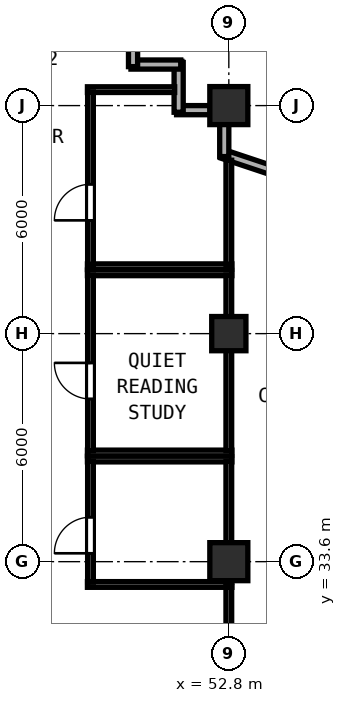
"""IFC4 building model, lengths in metres.
Left out: names, types, materials, properties, quantities, classifications, styles, units other than length and angle.
Written with IfcOpenShell. Run it as: python <this file> out.ifc"""

import sys

from ifc_helpers import new_model, si_unit, direction, frame, frame_2d, origin, origin_2d, place, context, subcontext, project, spatial, rectangle, hollow_rectangle, extrude, element, fill, save


model = new_model("IFC4")
c1 = context("Model", 3, precision=1e-05, world=origin(), true_north=direction((0.0, 1.0)))
c2 = subcontext(c1, "Body", "Model", "MODEL_VIEW")
j1 = project(units=[si_unit("LENGTHUNIT", "METRE"), si_unit("PLANEANGLEUNIT", "RADIAN")], contexts=[c1])
p1 = place(None, origin())
s1 = spatial("IfcSite", under=j1, at=p1, CompositionType="ELEMENT")
p2 = place(p1, origin())
s2 = spatial("IfcBuilding", under=s1, at=p2, CompositionType="ELEMENT")
p3 = place(p2, frame((0.0, 0.0, 121.2)))
s3 = spatial("IfcBuildingStorey", under=s2, at=p3, CompositionType="ELEMENT", Elevation=121.2)
for number, where, z_axis, x_axis in (
    (1, (52.8, 33.6, 0.0), (0.0, 0.0, 1.0), (1.0, 0.0, 0.0)),
    (2, (52.8, 45.6, 0.0), (0.0, 0.0, 1.0), (1.0, 0.0, 0.0)),
):
    element("IfcColumn", number, at=place(p3, frame(where, z_axis=z_axis, x_axis=x_axis)), inside=s3, PredefinedType="COLUMN", context=c2, shape_type="SweptSolid", body=[
        extrude(hollow_rectangle(XDim=1.0, YDim=1.0, WallThickness=0.038, at=origin_2d()), origin(), (0.0, 0.0, 1.0), 3.8),
    ])
p4 = place(p3, frame((52.8, 39.6, 0.0), z_axis=(0.0, 0.0, 1.0), x_axis=(1.0, 0.0, 0.0)))
e3 = element("IfcColumn", 3, at=p4, inside=s3, PredefinedType="COLUMN", context=c2, shape_type="SweptSolid", body=[
    extrude(hollow_rectangle(XDim=0.9, YDim=0.9, WallThickness=0.034, at=origin_2d()), origin(), (0.0, 0.0, 1.0), 3.8),
])
p5 = place(p3, frame((58.295, 42.442, 0.0), z_axis=(0.0, 0.0, 1.0), x_axis=(-0.948687385027, 0.316215504823, 0.0)))
e4 = element("IfcWall", 4, at=p5, inside=s3, PredefinedType="SOLIDWALL", context=c2, shape_type="SweptSolid", body=[
    extrude(rectangle(XDim=5.973, YDim=0.24, at=frame_2d((2.987, 0.0))), origin(), (0.0, 0.0, 1.0), 3.145),
])
p6 = place(p5, frame((1.796, 0.0, 0.85)))
e5 = element("IfcOpeningElement", 5, at=p6, cuts=e4, PredefinedType="OPENING", context=c2, shape_type="SweptSolid", body=[
    extrude(rectangle(XDim=1.15, YDim=1.8, at=frame_2d((0.575, 0.9))), frame((0.0, 0.13, 0.0), z_axis=(0.0, -1.0, 0.0), x_axis=(1.0, 0.0, 0.0)), (0.0, 0.0, 1.0), 0.26),
])
p7 = place(p5, frame((0.505, 0.0, 0.85)))
e6 = element("IfcOpeningElement", 6, at=p7, cuts=e4, PredefinedType="OPENING", context=c2, shape_type="SweptSolid", body=[
    extrude(rectangle(XDim=0.65, YDim=1.75, at=frame_2d((0.325, 0.875))), frame((0.0, 0.13, 0.0), z_axis=(0.0, -1.0, 0.0), x_axis=(1.0, 0.0, 0.0)), (0.0, 0.0, 1.0), 0.26),
])
p8 = place(p3, frame((52.68, 44.259, 0.0), z_axis=(0.0, 0.0, 1.0), x_axis=(0.0, 1.0, 0.0)))
e7 = element("IfcWall", 7, at=p8, inside=s3, PredefinedType="SOLIDWALL", context=c2, shape_type="SweptSolid", body=[
    extrude(rectangle(XDim=0.849, YDim=0.24, at=frame_2d((0.425, 0.0))), origin(), (0.0, 0.0, 1.0), 3.145),
])
p9 = place(p3, frame((52.308, 45.48, 0.0), z_axis=(0.0, 0.0, 1.0), x_axis=(-1.0, 0.0, 0.0)))
e8 = element("IfcWall", 8, at=p9, inside=s3, PredefinedType="SOLIDWALL", context=c2, shape_type="SweptSolid", body=[
    extrude(rectangle(XDim=0.883, YDim=0.24, at=frame_2d((0.441, 0.0))), origin(), (0.0, 0.0, 1.0), 3.6),
])
p10 = place(p3, frame((51.48, 45.425, 0.0), z_axis=(0.0, 0.0, 1.0), x_axis=(0.0, 1.0, 0.0)))
e9 = element("IfcWall", 9, at=p10, inside=s3, PredefinedType="SOLIDWALL", context=c2, shape_type="SweptSolid", body=[
    extrude(rectangle(XDim=1.31, YDim=0.24, at=frame_2d((0.655, 0.0))), origin(), (0.0, 0.0, 1.0), 3.6),
])
p11 = place(p3, frame((51.535, 46.68, 0.0), z_axis=(0.0, 0.0, 1.0), x_axis=(-1.0, 0.0, 0.0)))
e10 = element("IfcWall", 10, at=p11, inside=s3, PredefinedType="SOLIDWALL", context=c2, shape_type="SweptSolid", body=[
    extrude(rectangle(XDim=1.31, YDim=0.24, at=frame_2d((0.655, 0.0))), origin(), (0.0, 0.0, 1.0), 3.6),
])
p12 = place(p3, frame((50.28, 46.625, 0.0), z_axis=(0.0, 0.0, 1.0), x_axis=(0.0, 1.0, 0.0)))
e11 = element("IfcWall", 11, at=p12, inside=s3, PredefinedType="SOLIDWALL", context=c2, shape_type="SweptSolid", body=[
    extrude(rectangle(XDim=1.54, YDim=0.24, at=frame_2d((0.77, 0.0))), origin(), (0.0, 0.0, 1.0), 3.6),
])
for number, where, z_axis, x_axis in (
    (12, (49.08, 36.3, 0.0), (0.0, 0.0, 1.0), (1.0, 0.0, 0.0)),
    (13, (49.08, 33.0, 0.0), (0.0, 0.0, 1.0), (1.0, 0.0, 0.0)),
):
    element("IfcWall", number, at=place(p3, frame(where, z_axis=z_axis, x_axis=x_axis)), inside=s3, PredefinedType="PARTITIONING", context=c2, shape_type="SweptSolid", body=[
        extrude(rectangle(XDim=3.8, YDim=0.15, at=frame_2d((1.9, 0.0))), origin(), (0.0, 0.0, 1.0), 3.6),
    ])
p13 = place(p3, frame((49.16, 33.06, 0.0), z_axis=(0.0, 0.0, 1.0), x_axis=(0.0, 1.0, 0.0)))
e14 = element("IfcWall", 14, at=p13, inside=s3, PredefinedType="PARTITIONING", context=c2, shape_type="SweptSolid", body=[
    extrude(rectangle(XDim=3.18, YDim=0.15, at=frame_2d((1.59, 0.0))), origin(), (0.0, 0.0, 1.0), 3.6),
])
p14 = place(p13, frame((0.76, 0.0, 0.0)))
e15 = element("IfcOpeningElement", 15, at=p14, cuts=e14, PredefinedType="OPENING", context=c2, shape_type="SweptSolid", body=[
    extrude(rectangle(XDim=0.95, YDim=2.12, at=frame_2d((0.475, 1.06))), frame((0.0, 0.085, 0.0), z_axis=(0.0, -1.0, 0.0), x_axis=(1.0, 0.0, 0.0)), (0.0, 0.0, 1.0), 0.17),
])
p15 = place(p3, frame((52.8, 33.06, 0.0), z_axis=(0.0, 0.0, 1.0), x_axis=(0.0, 1.0, 0.0)))
e16 = element("IfcWall", 16, at=p15, inside=s3, PredefinedType="PARTITIONING", context=c2, shape_type="SweptSolid", body=[
    extrude(rectangle(XDim=3.18, YDim=0.15, at=frame_2d((1.59, 0.0))), origin(), (0.0, 0.0, 1.0), 3.145),
])
for number, where, z_axis, x_axis in (
    (17, (49.08, 41.2, 0.0), (0.0, 0.0, 1.0), (1.0, 0.0, 0.0)),
    (18, (49.08, 36.46, 0.0), (0.0, 0.0, 1.0), (1.0, 0.0, 0.0)),
):
    element("IfcWall", number, at=place(p3, frame(where, z_axis=z_axis, x_axis=x_axis)), inside=s3, PredefinedType="PARTITIONING", context=c2, shape_type="SweptSolid", body=[
        extrude(rectangle(XDim=3.8, YDim=0.15, at=frame_2d((1.9, 0.0))), origin(), (0.0, 0.0, 1.0), 3.6),
    ])
p16 = place(p3, frame((49.16, 36.52, 0.0), z_axis=(0.0, 0.0, 1.0), x_axis=(0.0, 1.0, 0.0)))
e19 = element("IfcWall", 19, at=p16, inside=s3, PredefinedType="PARTITIONING", context=c2, shape_type="SweptSolid", body=[
    extrude(rectangle(XDim=4.62, YDim=0.15, at=frame_2d((2.31, 0.0))), origin(), (0.0, 0.0, 1.0), 3.6),
])
p17 = place(p16, frame((1.36, 0.0, 0.0)))
e20 = element("IfcOpeningElement", 20, at=p17, cuts=e19, PredefinedType="OPENING", context=c2, shape_type="SweptSolid", body=[
    extrude(rectangle(XDim=0.95, YDim=2.12, at=frame_2d((0.475, 1.06))), frame((0.0, 0.085, 0.0), z_axis=(0.0, -1.0, 0.0), x_axis=(1.0, 0.0, 0.0)), (0.0, 0.0, 1.0), 0.17),
])
p18 = place(p3, frame((52.8, 36.52, 0.0), z_axis=(0.0, 0.0, 1.0), x_axis=(0.0, 1.0, 0.0)))
e21 = element("IfcWall", 21, at=p18, inside=s3, PredefinedType="PARTITIONING", context=c2, shape_type="SweptSolid", body=[
    extrude(rectangle(XDim=4.62, YDim=0.15, at=frame_2d((2.31, 0.0))), origin(), (0.0, 0.0, 1.0), 3.145),
])
p19 = place(p3, frame((49.08, 46.02, 0.0), z_axis=(0.0, 0.0, 1.0), x_axis=(1.0, 0.0, 0.0)))
e22 = element("IfcWall", 22, at=p19, inside=s3, PredefinedType="PARTITIONING", context=c2, shape_type="SweptSolid", body=[
    extrude(rectangle(XDim=2.295, YDim=0.15, at=frame_2d((1.147, 0.0))), origin(), (0.0, 0.0, 1.0), 3.6),
])
p20 = place(p3, frame((49.08, 41.36, 0.0), z_axis=(0.0, 0.0, 1.0), x_axis=(1.0, 0.0, 0.0)))
e23 = element("IfcWall", 23, at=p20, inside=s3, PredefinedType="PARTITIONING", context=c2, shape_type="SweptSolid", body=[
    extrude(rectangle(XDim=3.8, YDim=0.15, at=frame_2d((1.9, 0.0))), origin(), (0.0, 0.0, 1.0), 3.6),
])
p21 = place(p3, frame((49.16, 41.42, 0.0), z_axis=(0.0, 0.0, 1.0), x_axis=(0.0, 1.0, 0.0)))
e24 = element("IfcWall", 24, at=p21, inside=s3, PredefinedType="PARTITIONING", context=c2, shape_type="SweptSolid", body=[
    extrude(rectangle(XDim=4.54, YDim=0.15, at=frame_2d((2.27, 0.0))), origin(), (0.0, 0.0, 1.0), 3.6),
])
p22 = place(p21, frame((1.16, 0.0, 0.0)))
e25 = element("IfcOpeningElement", 25, at=p22, cuts=e24, PredefinedType="OPENING", context=c2, shape_type="SweptSolid", body=[
    extrude(rectangle(XDim=0.95, YDim=2.12, at=frame_2d((0.475, 1.06))), frame((0.0, 0.085, 0.0), z_axis=(0.0, -1.0, 0.0), x_axis=(1.0, 0.0, 0.0)), (0.0, 0.0, 1.0), 0.17),
])
p23 = place(p3, frame((52.8, 41.42, 0.0), z_axis=(0.0, 0.0, 1.0), x_axis=(0.0, 1.0, 0.0)))
e26 = element("IfcWall", 26, at=p23, inside=s3, PredefinedType="PARTITIONING", context=c2, shape_type="SweptSolid", body=[
    extrude(rectangle(XDim=2.743, YDim=0.15, at=frame_2d((1.372, 0.0))), origin(), (0.0, 0.0, 1.0), 3.145),
])
p24 = place(p3, frame((52.8, 31.19, 0.0), z_axis=(0.0, 0.0, 1.0), x_axis=(0.0, 1.0, 0.0)))
e27 = element("IfcWall", 27, at=p24, inside=s3, PredefinedType="PARTITIONING", context=c2, shape_type="SweptSolid", body=[
    extrude(rectangle(XDim=1.75, YDim=0.15, at=frame_2d((0.875, 0.0))), origin(), (0.0, 0.0, 1.0), 3.145),
])
p25 = place(p14, origin())
e28 = element("IfcDoor", 28, at=p25, inside=s3, OperationType="SINGLE_SWING_LEFT", PredefinedType="DOOR", context=c2, shape_type="SweptSolid", body=[
    extrude(rectangle(XDim=0.95, YDim=2.12, at=frame_2d((0.475, 1.06))), frame((0.0, 0.025, 0.0), z_axis=(0.0, -1.0, 0.0), x_axis=(1.0, 0.0, 0.0)), (0.0, 0.0, 1.0), 0.05),
])
fill(e15, e28)
p26 = place(p17, origin())
e29 = element("IfcDoor", 29, at=p26, inside=s3, OperationType="SINGLE_SWING_RIGHT", PredefinedType="DOOR", context=c2, shape_type="SweptSolid", body=[
    extrude(rectangle(XDim=0.95, YDim=2.12, at=frame_2d((0.475, 1.06))), frame((0.0, 0.025, 0.0), z_axis=(0.0, -1.0, 0.0), x_axis=(1.0, 0.0, 0.0)), (0.0, 0.0, 1.0), 0.05),
])
fill(e20, e29)
p27 = place(p22, origin())
e30 = element("IfcDoor", 30, at=p27, inside=s3, OperationType="SINGLE_SWING_LEFT", PredefinedType="DOOR", context=c2, shape_type="SweptSolid", body=[
    extrude(rectangle(XDim=0.95, YDim=2.12, at=frame_2d((0.475, 1.06))), frame((0.0, 0.025, 0.0), z_axis=(0.0, -1.0, 0.0), x_axis=(1.0, 0.0, 0.0)), (0.0, 0.0, 1.0), 0.05),
])
fill(e25, e30)
save(model, sys.argv[1])
